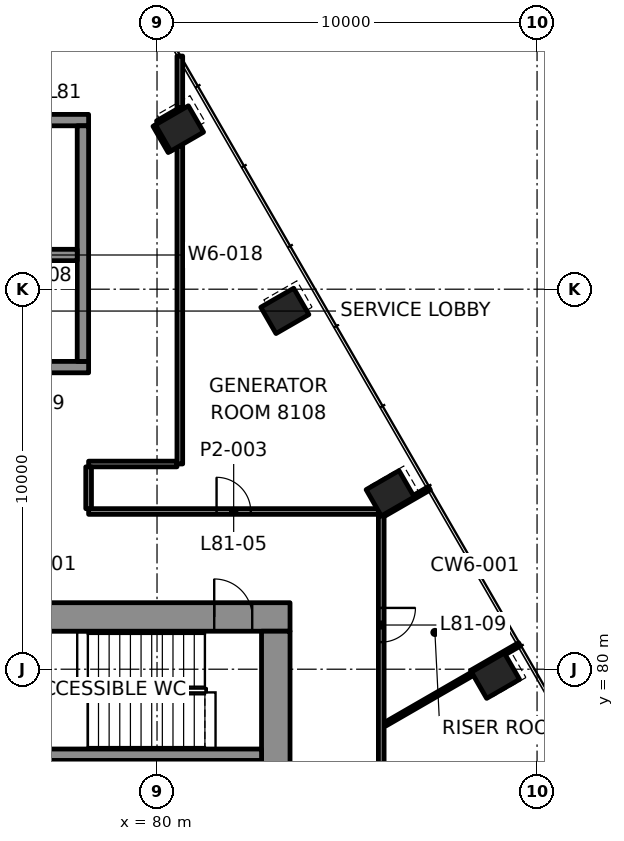
"""IFC4 building model, lengths in metres.
Left out: names, types, materials, properties, quantities, classifications, styles, units other than length and angle.
Written with IfcOpenShell. Run it as: python <this file> out.ifc"""

import sys

from ifc_helpers import new_model, si_unit, direction, frame, frame_2d, origin, origin_2d, place, context, subcontext, project, spatial, rectangle, hollow_rectangle, extrude, element, fill, save


model = new_model("IFC4")
c1 = context("Model", 3, precision=1e-05, world=origin(), true_north=direction((0.0, 1.0)))
c2 = subcontext(c1, "Body", "Model", "MODEL_VIEW")
j1 = project(units=[si_unit("LENGTHUNIT", "METRE"), si_unit("PLANEANGLEUNIT", "RADIAN")], contexts=[c1])
p1 = place(None, origin())
s1 = spatial("IfcSite", under=j1, at=p1, CompositionType="ELEMENT")
p2 = place(p1, origin())
s2 = spatial("IfcBuilding", under=s1, at=p2, CompositionType="ELEMENT")
p3 = place(p2, frame((0.0, 0.0, 331.6)))
s3 = spatial("IfcBuildingStorey", under=s2, at=p3, CompositionType="ELEMENT", Elevation=331.6)
for number, where, z_axis, x_axis in (
    (1, (88.906, 79.829, -0.0), (0.0, 0.0, 1.0), (-0.5, 0.866, 0.0)),
    (2, (86.135, 84.629, -0.0), (0.0, 0.0, 1.0), (-0.5, 0.866, 0.0)),
    (3, (83.364, 89.429, -0.0), (0.0, 0.0, 1.0), (-0.5, 0.866, 0.0)),
    (4, (80.592, 94.229, -0.0), (0.0, 0.0, 1.0), (-0.5, 0.866, 0.0)),
):
    element("IfcColumn", number, at=place(p3, frame(where, z_axis=z_axis, x_axis=x_axis)), inside=s3, PredefinedType="COLUMN", context=c2, shape_type="SweptSolid", body=[
        extrude(hollow_rectangle(XDim=0.8, YDim=1.0, WallThickness=0.05, at=origin_2d()), origin(), (0.0, 0.0, 1.0), 4.0),
    ])
p4 = place(p3, frame((66.5, 81.375, 0.0), z_axis=(0.0, 0.0, 1.0), x_axis=(1.0, 0.0, 0.0)))
e5 = element("IfcWall", 5, at=p4, inside=s3, PredefinedType="SHEAR", context=c2, shape_type="SweptSolid", body=[
    extrude(rectangle(XDim=17.0, YDim=0.75, at=frame_2d((8.5, 0.0))), origin(), (0.0, 0.0, 1.0), 3.7),
])
p5 = place(p4, frame((1.195, 0.0, 0.0)))
e6 = element("IfcOpeningElement", 6, at=p5, cuts=e5, PredefinedType="OPENING", context=c2, shape_type="SweptSolid", body=[
    extrude(rectangle(XDim=1.0, YDim=2.1, at=frame_2d((0.5, 1.05))), frame((0.0, 0.385, 0.0), z_axis=(0.0, -1.0, 0.0), x_axis=(1.0, 0.0, 0.0)), (0.0, 0.0, 1.0), 0.77),
])
p6 = place(p4, frame((15.005, 0.0, 0.0)))
e7 = element("IfcOpeningElement", 7, at=p6, cuts=e5, PredefinedType="OPENING", context=c2, shape_type="SweptSolid", body=[
    extrude(rectangle(XDim=1.0, YDim=2.1, at=frame_2d((0.5, 1.05))), frame((0.0, 0.385, 0.0), z_axis=(0.0, -1.0, 0.0), x_axis=(1.0, 0.0, 0.0)), (0.0, 0.0, 1.0), 0.77),
])
p7 = place(p4, frame((8.15, 0.0, 0.0)))
e8 = element("IfcOpeningElement", 8, at=p7, cuts=e5, PredefinedType="OPENING", context=c2, shape_type="SweptSolid", body=[
    extrude(rectangle(XDim=0.9, YDim=2.1, at=frame_2d((0.45, 1.05))), frame((0.0, 0.385, 0.0), z_axis=(0.0, -1.0, 0.0), x_axis=(1.0, 0.0, 0.0)), (0.0, 0.0, 1.0), 0.77),
])
p8 = place(p3, frame((83.125, 69.0, 0.0), z_axis=(0.0, 0.0, 1.0), x_axis=(0.0, 1.0, 0.0)))
e9 = element("IfcWall", 9, at=p8, inside=s3, PredefinedType="SHEAR", context=c2, shape_type="SweptSolid", body=[
    extrude(rectangle(XDim=12.0, YDim=0.75, at=frame_2d((6.0, 0.0))), origin(), (0.0, 0.0, 1.0), 3.7),
])
p9 = place(p8, frame((3.4, 0.0, 0.0)))
e10 = element("IfcOpeningElement", 10, at=p9, cuts=e9, PredefinedType="OPENING", context=c2, shape_type="SweptSolid", body=[
    extrude(rectangle(XDim=1.8, YDim=2.1, at=frame_2d((0.9, 1.05))), frame((0.0, 0.385, 0.0), z_axis=(0.0, -1.0, 0.0), x_axis=(1.0, 0.0, 0.0)), (0.0, 0.0, 1.0), 0.77),
])
p10 = place(p3, frame((67.25, 77.75, 0.0), z_axis=(0.0, 0.0, 1.0), x_axis=(1.0, 0.0, 0.0)))
e11 = element("IfcWall", 11, at=p10, inside=s3, PredefinedType="SHEAR", context=c2, shape_type="SweptSolid", body=[
    extrude(rectangle(XDim=15.5, YDim=0.3, at=frame_2d((7.75, 0.0))), origin(), (0.0, 0.0, 1.0), 3.7),
])
p11 = place(p10, frame((0.445, 0.0, 0.0)))
e12 = element("IfcOpeningElement", 12, at=p11, cuts=e11, PredefinedType="OPENING", context=c2, shape_type="SweptSolid", body=[
    extrude(rectangle(XDim=1.0, YDim=2.1, at=frame_2d((0.5, 1.05))), frame((0.0, 0.16, 0.0), z_axis=(0.0, -1.0, 0.0), x_axis=(1.0, 0.0, 0.0)), (0.0, 0.0, 1.0), 0.32),
])
p12 = place(p3, frame((71.8, 87.95, 0.0), z_axis=(0.0, 0.0, 1.0), x_axis=(1.0, 0.0, 0.0)))
e13 = element("IfcWall", 13, at=p12, inside=s3, PredefinedType="SHEAR", context=c2, shape_type="SweptSolid", body=[
    extrude(rectangle(XDim=6.4, YDim=0.3, at=frame_2d((3.2, 0.0))), origin(), (0.0, 0.0, 1.0), 3.7),
])
p13 = place(p12, frame((1.325, 0.0, 0.0)))
e14 = element("IfcOpeningElement", 14, at=p13, cuts=e13, PredefinedType="OPENING", context=c2, shape_type="SweptSolid", body=[
    extrude(rectangle(XDim=1.0, YDim=2.1, at=frame_2d((0.5, 1.05))), frame((0.0, 0.16, 0.0), z_axis=(0.0, -1.0, 0.0), x_axis=(1.0, 0.0, 0.0)), (0.0, 0.0, 1.0), 0.32),
])
p14 = place(p12, frame((4.125, 0.0, 0.0)))
e15 = element("IfcOpeningElement", 15, at=p14, cuts=e13, PredefinedType="OPENING", context=c2, shape_type="SweptSolid", body=[
    extrude(rectangle(XDim=1.2, YDim=2.1, at=frame_2d((0.6, 1.05))), frame((0.0, 0.16, 0.0), z_axis=(0.0, -1.0, 0.0), x_axis=(1.0, 0.0, 0.0)), (0.0, 0.0, 1.0), 0.32),
])
p15 = place(p3, frame((71.8, 94.45, 0.0), z_axis=(0.0, 0.0, 1.0), x_axis=(1.0, 0.0, 0.0)))
e16 = element("IfcWall", 16, at=p15, inside=s3, PredefinedType="SHEAR", context=c2, shape_type="SweptSolid", body=[
    extrude(rectangle(XDim=6.4, YDim=0.3, at=frame_2d((3.2, 0.0))), origin(), (0.0, 0.0, 1.0), 3.7),
])
p16 = place(p3, frame((78.05, 88.1, 0.0), z_axis=(0.0, 0.0, 1.0), x_axis=(0.0, 1.0, 0.0)))
e17 = element("IfcWall", 17, at=p16, inside=s3, PredefinedType="SHEAR", context=c2, shape_type="SweptSolid", body=[
    extrude(rectangle(XDim=6.2, YDim=0.3, at=frame_2d((3.1, 0.0))), origin(), (0.0, 0.0, 1.0), 3.7),
])
p17 = place(p3, frame((75.3, 90.9, 0.0), z_axis=(0.0, 0.0, 1.0), x_axis=(1.0, 0.0, 0.0)))
e18 = element("IfcWall", 18, at=p17, inside=s3, PredefinedType="SHEAR", context=c2, shape_type="SweptSolid", body=[
    extrude(rectangle(XDim=2.6, YDim=0.3, at=frame_2d((1.3, 0.0))), origin(), (0.0, 0.0, 1.0), 3.7),
])
p18 = place(p17, frame((0.675, 0.0, 0.0)))
e19 = element("IfcOpeningElement", 19, at=p18, cuts=e18, PredefinedType="OPENING", context=c2, shape_type="SweptSolid", body=[
    extrude(rectangle(XDim=1.1, YDim=2.1, at=frame_2d((0.55, 1.05))), frame((0.0, 0.16, 0.0), z_axis=(0.0, -1.0, 0.0), x_axis=(1.0, 0.0, 0.0)), (0.0, 0.0, 1.0), 0.32),
])
p19 = place(p3, frame((78.2, 84.15, 0.0), z_axis=(0.0, 0.0, 1.0), x_axis=(1.0, 0.0, 0.0)))
e20 = element("IfcWall", 20, at=p19, inside=s3, PredefinedType="PARTITIONING", context=c2, shape_type="SweptSolid", body=[
    extrude(rectangle(XDim=7.634, YDim=0.15, at=frame_2d((3.817, 0.0))), origin(), (0.0, 0.0, 1.0), 3.1),
])
p20 = place(p19, frame((3.367, 0.0, 0.0)))
e21 = element("IfcOpeningElement", 21, at=p20, cuts=e20, PredefinedType="OPENING", context=c2, shape_type="SweptSolid", body=[
    extrude(rectangle(XDim=0.9, YDim=2.1, at=frame_2d((0.45, 1.05))), frame((0.0, 0.085, 0.0), z_axis=(0.0, -1.0, 0.0), x_axis=(1.0, 0.0, 0.0)), (0.0, 0.0, 1.0), 0.17),
])
p21 = place(p3, frame((78.2, 85.4, 0.0), z_axis=(0.0, 0.0, 1.0), x_axis=(1.0, 0.0, 0.0)))
e22 = element("IfcWall", 22, at=p21, inside=s3, PredefinedType="PARTITIONING", context=c2, shape_type="SweptSolid", body=[
    extrude(rectangle(XDim=2.324, YDim=0.15, at=frame_2d((1.162, 0.0))), origin(), (0.0, 0.0, 1.0), 3.1),
])
p22 = place(p3, frame((86.001, 78.551, 0.0), z_axis=(0.0, 0.0, 1.0), x_axis=(0.86602171968, 0.500006381002, 0.0)))
e23 = element("IfcWall", 23, at=p22, inside=s3, PredefinedType="PARTITIONING", context=c2, shape_type="SweptSolid", body=[
    extrude(rectangle(XDim=2.655, YDim=0.1, at=frame_2d((1.327, 0.0))), origin(), (0.0, 0.0, 1.0), 3.1),
])
p23 = place(p3, frame((88.273, 79.925, 0.0), z_axis=(0.0, 0.0, 1.0), x_axis=(0.866032430508, 0.49998782916, 0.0)))
e24 = element("IfcWall", 24, at=p23, inside=s3, PredefinedType="PARTITIONING", context=c2, shape_type="SweptSolid", body=[
    extrude(rectangle(XDim=1.46, YDim=0.1, at=frame_2d((0.73, 0.0))), origin(), (0.0, 0.0, 1.0), 3.088),
])
p24 = place(p3, frame((85.978, 84.076, 0.0), z_axis=(0.0, 0.0, 1.0), x_axis=(0.866001980287, 0.500040568494, 0.0)))
e25 = element("IfcWall", 25, at=p24, inside=s3, PredefinedType="PARTITIONING", context=c2, shape_type="SweptSolid", body=[
    extrude(rectangle(XDim=1.373, YDim=0.1, at=frame_2d((0.687, 0.0))), origin(), (0.0, 0.0, 1.0), 3.088),
])
p25 = place(p3, frame((80.024, 94.364, 0.0), z_axis=(0.0, 0.0, 1.0), x_axis=(0.865995903571, 0.500051092388, 0.0)))
e26 = element("IfcWall", 26, at=p25, inside=s3, PredefinedType="PARTITIONING", context=c2, shape_type="SweptSolid", body=[
    extrude(rectangle(XDim=0.665, YDim=0.15, at=frame_2d((0.332, 0.0))), origin(), (0.0, 0.0, 1.0), 3.1),
])
p26 = place(p3, frame((85.9, 84.036, 0.0), z_axis=(0.0, 0.0, 1.0), x_axis=(0.0, -1.0, 0.0)))
e27 = element("IfcWall", 27, at=p26, inside=s3, PredefinedType="PARTITIONING", context=c2, shape_type="SweptSolid", body=[
    extrude(rectangle(XDim=13.943, YDim=0.15, at=frame_2d((6.972, 0.0))), origin(), (0.0, 0.0, 1.0), 3.1),
])
p27 = place(p26, frame((2.423, 0.0, 0.0)))
e28 = element("IfcOpeningElement", 28, at=p27, cuts=e27, PredefinedType="OPENING", context=c2, shape_type="SweptSolid", body=[
    extrude(rectangle(XDim=0.9, YDim=2.1, at=frame_2d((0.45, 1.05))), frame((0.0, 0.085, 0.0), z_axis=(0.0, -1.0, 0.0), x_axis=(1.0, 0.0, 0.0)), (0.0, 0.0, 1.0), 0.17),
])
p28 = place(p26, frame((9.191, 0.0, 0.0)))
e29 = element("IfcOpeningElement", 29, at=p28, cuts=e27, PredefinedType="OPENING", context=c2, shape_type="SweptSolid", body=[
    extrude(rectangle(XDim=0.9, YDim=2.1, at=frame_2d((0.45, 1.05))), frame((0.0, 0.085, 0.0), z_axis=(0.0, -1.0, 0.0), x_axis=(1.0, 0.0, 0.0)), (0.0, 0.0, 1.0), 0.17),
])
p29 = place(p3, frame((80.6, 85.401, 0.0), z_axis=(0.0, 0.0, 1.0), x_axis=(0.0, 1.0, 0.0)))
e30 = element("IfcWall", 30, at=p29, inside=s3, PredefinedType="PARTITIONING", context=c2, shape_type="SweptSolid", body=[
    extrude(rectangle(XDim=8.371, YDim=0.15, at=frame_2d((4.185, 0.0))), origin(), (0.0, 0.0, 1.0), 3.1),
])
p30 = place(p3, frame((80.6, 94.783, 0.0), z_axis=(0.0, 0.0, 1.0), x_axis=(0.0, 1.0, 0.0)))
e31 = element("IfcWall", 31, at=p30, inside=s3, PredefinedType="PARTITIONING", context=c2, shape_type="SweptSolid", body=[
    extrude(rectangle(XDim=1.353, YDim=0.15, at=frame_2d((0.676, 0.0))), origin(), (0.0, 0.0, 1.0), 3.1),
])
p31 = place(p3, frame((78.2, 84.225, 0.0), z_axis=(0.0, 0.0, 1.0), x_axis=(0.0, 1.0, 0.0)))
e32 = element("IfcWall", 32, at=p31, inside=s3, PredefinedType="PARTITIONING", context=c2, shape_type="SweptSolid", body=[
    extrude(rectangle(XDim=1.1, YDim=0.15, at=frame_2d((0.55, 0.0))), origin(), (0.0, 0.0, 1.0), 3.1),
])
p32 = place(p3, frame((80.358, 93.633, 0.0), z_axis=(0.0, 0.0, 1.0), x_axis=(-0.499951716245, 0.866053278629, 0.0)))
e33 = element("IfcWall", 33, at=p32, inside=s3, PredefinedType="PARTITIONING", context=c2, shape_type="SweptSolid", body=[
    extrude(rectangle(XDim=0.799, YDim=0.15, at=frame_2d((0.399, 0.0))), origin(), (0.0, 0.0, 1.0), 3.1),
])
for number, where, z_axis, x_axis in (
    (34, (78.85, 74.95, 0.0), (0.0, 0.0, 1.0), (0.0, 1.0, 0.0)),
    (35, (81.65, 74.95, 0.0), (0.0, 0.0, 1.0), (0.0, 1.0, 0.0)),
):
    element("IfcWall", number, at=place(p3, frame(where, z_axis=z_axis, x_axis=x_axis)), inside=s3, PredefinedType="PARTITIONING", context=c2, shape_type="SweptSolid", body=[
        extrude(rectangle(XDim=2.65, YDim=0.2, at=frame_2d((1.325, 0.0))), origin(), (0.0, 0.0, 1.0), 3.7),
    ])
p33 = place(p20, origin())
e36 = element("IfcDoor", 36, at=p33, inside=s3, OperationType="SINGLE_SWING_LEFT", PredefinedType="DOOR", context=c2, shape_type="SweptSolid", body=[
    extrude(rectangle(XDim=0.9, YDim=2.1, at=frame_2d((0.45, 1.05))), frame((0.0, 0.025, 0.0), z_axis=(0.0, -1.0, 0.0), x_axis=(1.0, 0.0, 0.0)), (0.0, 0.0, 1.0), 0.05),
])
fill(e21, e36)
p34 = place(p27, origin())
e37 = element("IfcDoor", 37, at=p34, inside=s3, OperationType="SINGLE_SWING_LEFT", PredefinedType="DOOR", context=c2, shape_type="SweptSolid", body=[
    extrude(rectangle(XDim=0.9, YDim=2.1, at=frame_2d((0.45, 1.05))), frame((0.0, 0.025, 0.0), z_axis=(0.0, -1.0, 0.0), x_axis=(1.0, 0.0, 0.0)), (0.0, 0.0, 1.0), 0.05),
])
fill(e28, e37)
p35 = place(p6, origin())
e38 = element("IfcDoor", 38, at=p35, inside=s3, OperationType="SINGLE_SWING_LEFT", PredefinedType="DOOR", context=c2, shape_type="SweptSolid", body=[
    extrude(rectangle(XDim=1.0, YDim=2.1, at=frame_2d((0.5, 1.05))), frame((0.0, 0.095, 0.0), z_axis=(0.0, -1.0, 0.0), x_axis=(1.0, 0.0, 0.0)), (0.0, 0.0, 1.0), 0.19),
])
fill(e7, e38)
save(model, sys.argv[1])
